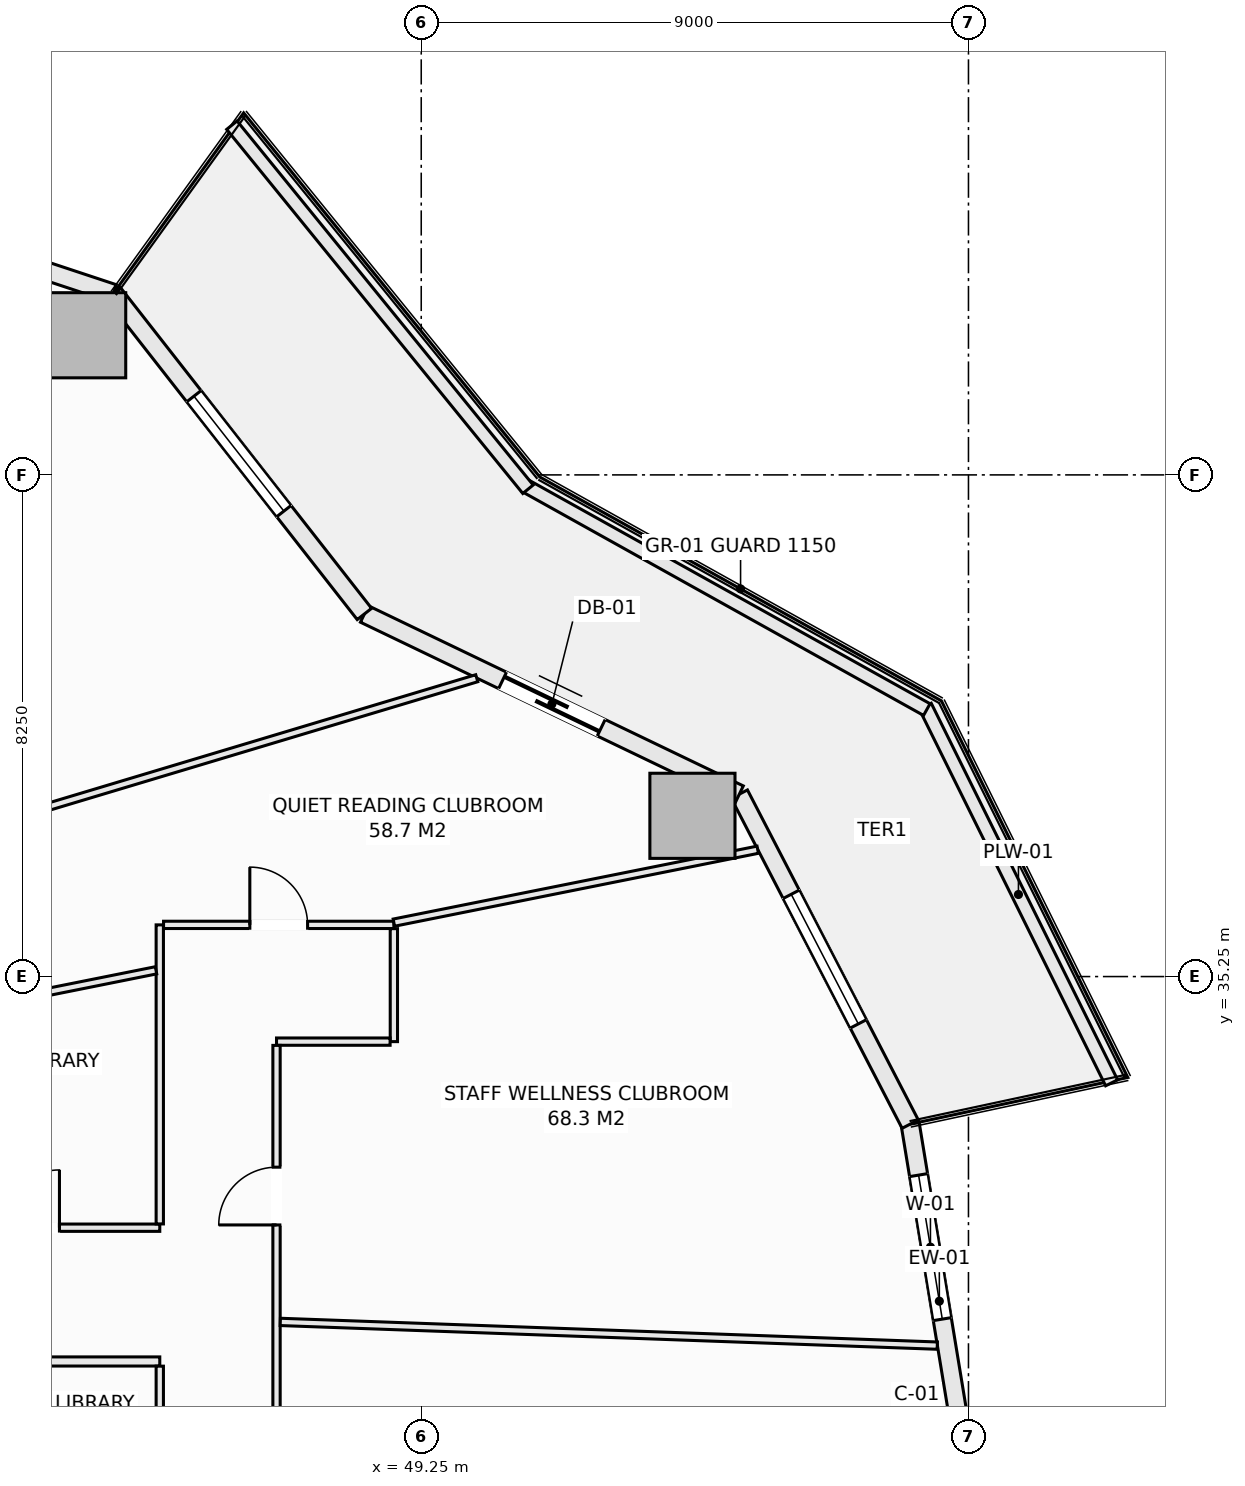
"""IFC4 building model, lengths in metres.
Left out: names, types, materials, properties, quantities, classifications, styles, units other than length and angle.
Written with IfcOpenShell. Run it as: python <this file> out.ifc"""

import sys

from ifc_helpers import new_model, si_unit, direction, frame, frame_2d, origin, origin_2d, place, context, subcontext, project, spatial, rectangle, extrude, element, fill, save


model = new_model("IFC4")
c1 = context("Model", 3, precision=1e-05, world=origin(), true_north=direction((0.0, 1.0)))
c2 = subcontext(c1, "Body", "Model", "MODEL_VIEW")
j1 = project(units=[si_unit("LENGTHUNIT", "METRE"), si_unit("PLANEANGLEUNIT", "RADIAN")], contexts=[c1])
p1 = place(None, origin())
s1 = spatial("IfcSite", under=j1, at=p1, CompositionType="ELEMENT")
p2 = place(p1, origin())
s2 = spatial("IfcBuilding", under=s1, at=p2, CompositionType="ELEMENT")
p3 = place(p2, frame((0.0, 0.0, 45.75)))
s3 = spatial("IfcBuildingStorey", under=s2, at=p3, CompositionType="ELEMENT", Elevation=45.75)
for number, where, z_axis, x_axis in (
    (1, (53.71, 37.894, -0.28), (0.0, 0.0, 1.0), (1.0, 0.0, 0.0)),
    (2, (43.69, 45.796, -0.28), (0.0, 0.0, 1.0), (1.0, 0.0, 0.0)),
):
    element("IfcColumn", number, at=place(p3, frame(where, z_axis=z_axis, x_axis=x_axis)), inside=s3, PredefinedType="COLUMN", context=c2, shape_type="SweptSolid", body=[
        extrude(rectangle(XDim=1.4, YDim=1.4, at=origin_2d()), origin(), (0.0, 0.0, 1.0), 3.85),
    ])
p4 = place(p3, frame((57.292, 32.823, 0.0), z_axis=(0.0, 0.0, 1.0), x_axis=(0.162366057843, -0.98673059305, 0.0)))
e3 = element("IfcWall", 3, at=p4, inside=s3, PredefinedType="SOLIDWALL", context=c2, shape_type="SweptSolid", body=[
    extrude(rectangle(XDim=5.902, YDim=0.3, at=frame_2d((2.951, 0.0))), origin(), (0.0, 0.0, 1.0), 3.093),
])
p5 = place(p4, frame((0.85, 0.0, 0.85)))
e4 = element("IfcOpeningElement", 4, at=p5, cuts=e3, PredefinedType="OPENING", context=c2, shape_type="SweptSolid", body=[
    extrude(rectangle(XDim=2.4, YDim=1.9, at=frame_2d((1.2, 0.95))), frame((0.0, 0.16, 0.0), z_axis=(0.0, -1.0, 0.0), x_axis=(1.0, 0.0, 0.0)), (0.0, 0.0, 1.0), 0.32),
])
p6 = place(p3, frame((54.482, 38.25, 0.0), z_axis=(0.0, 0.0, 1.0), x_axis=(0.459809804413, -0.88801742312, 0.0)))
e5 = element("IfcWall", 5, at=p6, inside=s3, PredefinedType="SOLIDWALL", context=c2, shape_type="SweptSolid", body=[
    extrude(rectangle(XDim=6.111, YDim=0.3, at=frame_2d((3.055, 0.0))), origin(), (0.0, 0.0, 1.0), 3.093),
])
p7 = place(p6, frame((1.855, 0.0, 0.85)))
e6 = element("IfcOpeningElement", 6, at=p7, cuts=e5, PredefinedType="OPENING", context=c2, shape_type="SweptSolid", body=[
    extrude(rectangle(XDim=2.4, YDim=1.9, at=frame_2d((1.2, 0.95))), frame((0.0, 0.16, 0.0), z_axis=(0.0, -1.0, 0.0), x_axis=(1.0, 0.0, 0.0)), (0.0, 0.0, 1.0), 0.32),
])
p8 = place(p3, frame((48.315, 41.213, 0.0), z_axis=(0.0, 0.0, 1.0), x_axis=(0.901360393999, -0.433069786673, 0.0)))
e7 = element("IfcWall", 7, at=p8, inside=s3, PredefinedType="SOLIDWALL", context=c2, shape_type="SweptSolid", body=[
    extrude(rectangle(XDim=6.842, YDim=0.3, at=frame_2d((3.421, 0.0))), origin(), (0.0, 0.0, 1.0), 3.093),
])
p9 = place(p8, frame((2.521, 0.0, 0.0)))
e8 = element("IfcOpeningElement", 8, at=p9, cuts=e7, PredefinedType="OPENING", context=c2, shape_type="SweptSolid", body=[
    extrude(rectangle(XDim=1.8, YDim=2.25, at=frame_2d((0.9, 1.125))), frame((0.0, 0.16, 0.0), z_axis=(0.0, -1.0, 0.0), x_axis=(1.0, 0.0, 0.0)), (0.0, 0.0, 1.0), 0.32),
])
p10 = place(p3, frame((44.188, 46.486, 0.0), z_axis=(0.0, 0.0, 1.0), x_axis=(0.616421309777, -0.787416515482, 0.0)))
e9 = element("IfcWall", 9, at=p10, inside=s3, PredefinedType="SOLIDWALL", context=c2, shape_type="SweptSolid", body=[
    extrude(rectangle(XDim=6.696, YDim=0.3, at=frame_2d((3.348, 0.0))), origin(), (0.0, 0.0, 1.0), 3.093),
])
p11 = place(p10, frame((2.148, 0.0, 0.85)))
e10 = element("IfcOpeningElement", 10, at=p11, cuts=e9, PredefinedType="OPENING", context=c2, shape_type="SweptSolid", body=[
    extrude(rectangle(XDim=2.4, YDim=1.9, at=frame_2d((1.2, 0.95))), frame((0.0, 0.16, 0.0), z_axis=(0.0, -1.0, 0.0), x_axis=(1.0, 0.0, 0.0)), (0.0, 0.0, 1.0), 0.32),
])
p12 = place(p3, frame((37.404, 48.733, 0.0), z_axis=(0.0, 0.0, 1.0), x_axis=(0.949238715533, -0.31455661006, 0.0)))
e11 = element("IfcWall", 11, at=p12, inside=s3, PredefinedType="SOLIDWALL", context=c2, shape_type="SweptSolid", body=[
    extrude(rectangle(XDim=7.146, YDim=0.3, at=frame_2d((3.573, 0.0))), origin(), (0.0, 0.0, 1.0), 3.093),
])
p13 = place(p12, frame((2.373, 0.0, 0.85)))
e12 = element("IfcOpeningElement", 12, at=p13, cuts=e11, PredefinedType="OPENING", context=c2, shape_type="SweptSolid", body=[
    extrude(rectangle(XDim=2.4, YDim=1.9, at=frame_2d((1.2, 0.95))), frame((0.0, 0.16, 0.0), z_axis=(0.0, -1.0, 0.0), x_axis=(1.0, 0.0, 0.0)), (0.0, 0.0, 1.0), 0.32),
])
p14 = place(p3, frame((57.539, 39.697, 0.0), z_axis=(0.0, 0.0, 1.0), x_axis=(0.443578479433, -0.8962355341, 0.0)))
e13 = element("IfcWall", 13, at=p14, inside=s3, PredefinedType="PARAPET", context=c2, shape_type="SweptSolid", body=[
    extrude(rectangle(XDim=6.911, YDim=0.22, at=frame_2d((3.456, 0.0))), origin(), (0.0, 0.0, 1.0), 0.52),
])
p15 = place(p3, frame((50.959, 43.322, 0.0), z_axis=(0.0, 0.0, 1.0), x_axis=(0.873500119739, -0.48682393205, 0.0)))
e14 = element("IfcWall", 14, at=p15, inside=s3, PredefinedType="PARAPET", context=c2, shape_type="SweptSolid", body=[
    extrude(rectangle(XDim=7.562, YDim=0.22, at=frame_2d((3.781, 0.0))), origin(), (0.0, 0.0, 1.0), 0.52),
])
p16 = place(p3, frame((46.136, 49.251, 0.0), z_axis=(0.0, 0.0, 1.0), x_axis=(0.630997450658, -0.775784903993, 0.0)))
e15 = element("IfcWall", 15, at=p16, inside=s3, PredefinedType="PARAPET", context=c2, shape_type="SweptSolid", body=[
    extrude(rectangle(XDim=7.718, YDim=0.22, at=frame_2d((3.859, 0.0))), origin(), (0.0, 0.0, 1.0), 0.52),
])
p17 = place(p3, frame((30.077, 28.92, 0.0), z_axis=(0.0, 0.0, 1.0), x_axis=(1.0, 0.0, 0.0)))
e16 = element("IfcWall", 16, at=p17, inside=s3, PredefinedType="PARTITIONING", context=c2, shape_type="SweptSolid", body=[
    extrude(rectangle(XDim=14.873, YDim=0.15, at=frame_2d((7.437, 0.0))), origin(), (0.0, 0.0, 1.0), 3.57),
])
p18 = place(p3, frame((39.02, 31.12, 0.0), z_axis=(0.0, 0.0, 1.0), x_axis=(1.0, 0.0, 0.0)))
e17 = element("IfcWall", 17, at=p18, inside=s3, PredefinedType="PARTITIONING", context=c2, shape_type="SweptSolid", body=[
    extrude(rectangle(XDim=5.93, YDim=0.12, at=frame_2d((2.965, 0.0))), origin(), (0.0, 0.0, 1.0), 3.57),
])
p19 = place(p18, frame((3.33, 0.0, 0.0)))
e18 = element("IfcOpeningElement", 18, at=p19, cuts=e17, PredefinedType="OPENING", context=c2, shape_type="SweptSolid", body=[
    extrude(rectangle(XDim=0.95, YDim=2.1, at=frame_2d((0.475, 1.05))), frame((0.0, 0.07, 0.0), z_axis=(0.0, -1.0, 0.0), x_axis=(1.0, 0.0, 0.0)), (0.0, 0.0, 1.0), 0.14),
])
p20 = place(p3, frame((44.95, 25.197, 0.0), z_axis=(0.0, 0.0, 1.0), x_axis=(0.0, 1.0, 0.0)))
e19 = element("IfcWall", 19, at=p20, inside=s3, PredefinedType="PARTITIONING", context=c2, shape_type="SweptSolid", body=[
    extrude(rectangle(XDim=3.646, YDim=0.12, at=frame_2d((1.823, 0.0))), origin(), (0.0, 0.0, 1.0), 3.57),
])
p21 = place(p3, frame((44.95, 31.182, 0.0), z_axis=(0.0, 0.0, 1.0), x_axis=(0.0, 1.0, 0.0)))
e20 = element("IfcWall", 20, at=p21, inside=s3, PredefinedType="PARTITIONING", context=c2, shape_type="SweptSolid", body=[
    extrude(rectangle(XDim=4.918, YDim=0.12, at=frame_2d((2.459, 0.0))), origin(), (0.0, 0.0, 1.0), 3.57),
])
p22 = place(p3, frame((45.012, 36.1, 0.0), z_axis=(0.0, 0.0, 1.0), x_axis=(1.0, 0.0, 0.0)))
e21 = element("IfcWall", 21, at=p22, inside=s3, PredefinedType="PARTITIONING", context=c2, shape_type="SweptSolid", body=[
    extrude(rectangle(XDim=3.788, YDim=0.12, at=frame_2d((1.894, 0.0))), origin(), (0.0, 0.0, 1.0), 3.57),
])
p23 = place(p22, frame((1.419, 0.0, 0.0)))
e22 = element("IfcOpeningElement", 22, at=p23, cuts=e21, PredefinedType="OPENING", context=c2, shape_type="SweptSolid", body=[
    extrude(rectangle(XDim=0.95, YDim=2.1, at=frame_2d((0.475, 1.05))), frame((0.0, 0.07, 0.0), z_axis=(0.0, -1.0, 0.0), x_axis=(1.0, 0.0, 0.0)), (0.0, 0.0, 1.0), 0.14),
])
p24 = place(p3, frame((48.8, 34.18, 0.0), z_axis=(0.0, 0.0, 1.0), x_axis=(0.0, 1.0, 0.0)))
e23 = element("IfcWall", 23, at=p24, inside=s3, PredefinedType="PARTITIONING", context=c2, shape_type="SweptSolid", body=[
    extrude(rectangle(XDim=1.858, YDim=0.12, at=frame_2d((0.929, 0.0))), origin(), (0.0, 0.0, 1.0), 3.57),
])
p25 = place(p3, frame((46.87, 34.18, 0.0), z_axis=(0.0, 0.0, 1.0), x_axis=(1.0, 0.0, 0.0)))
e24 = element("IfcWall", 24, at=p25, inside=s3, PredefinedType="PARTITIONING", context=c2, shape_type="SweptSolid", body=[
    extrude(rectangle(XDim=1.868, YDim=0.12, at=frame_2d((0.934, 0.0))), origin(), (0.0, 0.0, 1.0), 3.57),
])
p26 = place(p3, frame((46.87, 19.32, 0.0), z_axis=(0.0, 0.0, 1.0), x_axis=(0.0, 1.0, 0.0)))
e25 = element("IfcWall", 25, at=p26, inside=s3, PredefinedType="PARTITIONING", context=c2, shape_type="SweptSolid", body=[
    extrude(rectangle(XDim=14.798, YDim=0.12, at=frame_2d((7.399, 0.0))), origin(), (0.0, 0.0, 1.0), 3.57),
])
p27 = place(p26, frame((5.265, 0.0, 0.0)))
e26 = element("IfcOpeningElement", 26, at=p27, cuts=e25, PredefinedType="OPENING", context=c2, shape_type="SweptSolid", body=[
    extrude(rectangle(XDim=0.95, YDim=2.1, at=frame_2d((0.475, 1.05))), frame((0.0, 0.07, 0.0), z_axis=(0.0, -1.0, 0.0), x_axis=(1.0, 0.0, 0.0)), (0.0, 0.0, 1.0), 0.14),
])
p28 = place(p26, frame((11.845, 0.0, 0.0)))
e27 = element("IfcOpeningElement", 27, at=p28, cuts=e25, PredefinedType="OPENING", context=c2, shape_type="SweptSolid", body=[
    extrude(rectangle(XDim=0.95, YDim=2.1, at=frame_2d((0.475, 1.05))), frame((0.0, 0.07, 0.0), z_axis=(0.0, -1.0, 0.0), x_axis=(1.0, 0.0, 0.0)), (0.0, 0.0, 1.0), 0.14),
])
p29 = place(p3, frame((37.698, 33.912, 0.0), z_axis=(0.0, 0.0, 1.0), x_axis=(0.980510182708, 0.196468271245, 0.0)))
e28 = element("IfcWall", 28, at=p29, inside=s3, PredefinedType="PARTITIONING", context=c2, shape_type="SweptSolid", body=[
    extrude(rectangle(XDim=7.333, YDim=0.12, at=frame_2d((3.667, 0.0))), origin(), (0.0, 0.0, 1.0), 3.57),
])
p30 = place(p3, frame((48.8, 36.137, 0.0), z_axis=(0.0, 0.0, 1.0), x_axis=(0.980512919928, 0.196454610165, 0.0)))
e29 = element("IfcWall", 29, at=p30, inside=s3, PredefinedType="PARTITIONING", context=c2, shape_type="SweptSolid", body=[
    extrude(rectangle(XDim=6.103, YDim=0.12, at=frame_2d((3.052, 0.0))), origin(), (0.0, 0.0, 1.0), 3.205),
])
p31 = place(p3, frame((46.932, 29.571, 0.0), z_axis=(0.0, 0.0, 1.0), x_axis=(0.999348798182, -0.036082954031, 0.0)))
e30 = element("IfcWall", 30, at=p31, inside=s3, PredefinedType="PARTITIONING", context=c2, shape_type="SweptSolid", body=[
    extrude(rectangle(XDim=10.812, YDim=0.12, at=frame_2d((5.406, 0.0))), origin(), (0.0, 0.0, 1.0), 3.57),
])
p32 = place(p3, frame((29.842, 34.058, 0.0), z_axis=(0.0, 0.0, 1.0), x_axis=(0.957798094038, 0.287441839435, 0.0)))
e31 = element("IfcWall", 31, at=p32, inside=s3, PredefinedType="PARTITIONING", context=c2, shape_type="SweptSolid", body=[
    extrude(rectangle(XDim=21.217, YDim=0.12, at=frame_2d((10.608, 0.0))), origin(), (0.0, 0.0, 1.0), 3.205),
])
p33 = place(p5, origin())
e32 = element("IfcWindow", 32, at=p33, inside=s3, PartitioningType="SINGLE_PANEL", PredefinedType="WINDOW", context=c2, shape_type="SweptSolid", body=[
    extrude(rectangle(XDim=2.4, YDim=1.9, at=frame_2d((1.2, 0.95))), frame((0.0, 0.03, 0.0), z_axis=(0.0, -1.0, 0.0), x_axis=(1.0, 0.0, 0.0)), (0.0, 0.0, 1.0), 0.06),
])
fill(e4, e32)
p34 = place(p7, origin())
e33 = element("IfcWindow", 33, at=p34, inside=s3, PartitioningType="SINGLE_PANEL", PredefinedType="WINDOW", context=c2, shape_type="SweptSolid", body=[
    extrude(rectangle(XDim=2.4, YDim=1.9, at=frame_2d((1.2, 0.95))), frame((0.0, 0.03, 0.0), z_axis=(0.0, -1.0, 0.0), x_axis=(1.0, 0.0, 0.0)), (0.0, 0.0, 1.0), 0.06),
])
fill(e6, e33)
p35 = place(p9, origin())
e34 = element("IfcDoor", 34, at=p35, inside=s3, OperationType="SLIDING_TO_LEFT", PredefinedType="DOOR", context=c2, shape_type="SweptSolid", body=[
    extrude(rectangle(XDim=1.8, YDim=2.25, at=frame_2d((0.9, 1.125))), frame((0.0, 0.025, 0.0), z_axis=(0.0, -1.0, 0.0), x_axis=(1.0, 0.0, 0.0)), (0.0, 0.0, 1.0), 0.05),
])
fill(e8, e34)
p36 = place(p11, origin())
e35 = element("IfcWindow", 35, at=p36, inside=s3, PartitioningType="SINGLE_PANEL", PredefinedType="WINDOW", context=c2, shape_type="SweptSolid", body=[
    extrude(rectangle(XDim=2.4, YDim=1.9, at=frame_2d((1.2, 0.95))), frame((0.0, 0.03, 0.0), z_axis=(0.0, -1.0, 0.0), x_axis=(1.0, 0.0, 0.0)), (0.0, 0.0, 1.0), 0.06),
])
fill(e10, e35)
p37 = place(p28, origin())
e36 = element("IfcDoor", 36, at=p37, inside=s3, OperationType="SINGLE_SWING_LEFT", PredefinedType="DOOR", context=c2, shape_type="SweptSolid", body=[
    extrude(rectangle(XDim=0.95, YDim=2.1, at=frame_2d((0.475, 1.05))), frame((0.0, 0.025, 0.0), z_axis=(0.0, -1.0, 0.0), x_axis=(1.0, 0.0, 0.0)), (0.0, 0.0, 1.0), 0.05),
])
fill(e27, e36)
p38 = place(p19, origin())
e37 = element("IfcDoor", 37, at=p38, inside=s3, OperationType="SINGLE_SWING_RIGHT", PredefinedType="DOOR", context=c2, shape_type="SweptSolid", body=[
    extrude(rectangle(XDim=0.95, YDim=2.1, at=frame_2d((0.475, 1.05))), frame((0.0, 0.025, 0.0), z_axis=(0.0, -1.0, 0.0), x_axis=(1.0, 0.0, 0.0)), (0.0, 0.0, 1.0), 0.05),
])
fill(e18, e37)
p39 = place(p23, origin())
e38 = element("IfcDoor", 38, at=p39, inside=s3, OperationType="SINGLE_SWING_LEFT", PredefinedType="DOOR", context=c2, shape_type="SweptSolid", body=[
    extrude(rectangle(XDim=0.95, YDim=2.1, at=frame_2d((0.475, 1.05))), frame((0.0, 0.025, 0.0), z_axis=(0.0, -1.0, 0.0), x_axis=(1.0, 0.0, 0.0)), (0.0, 0.0, 1.0), 0.05),
])
fill(e22, e38)
save(model, sys.argv[1])
